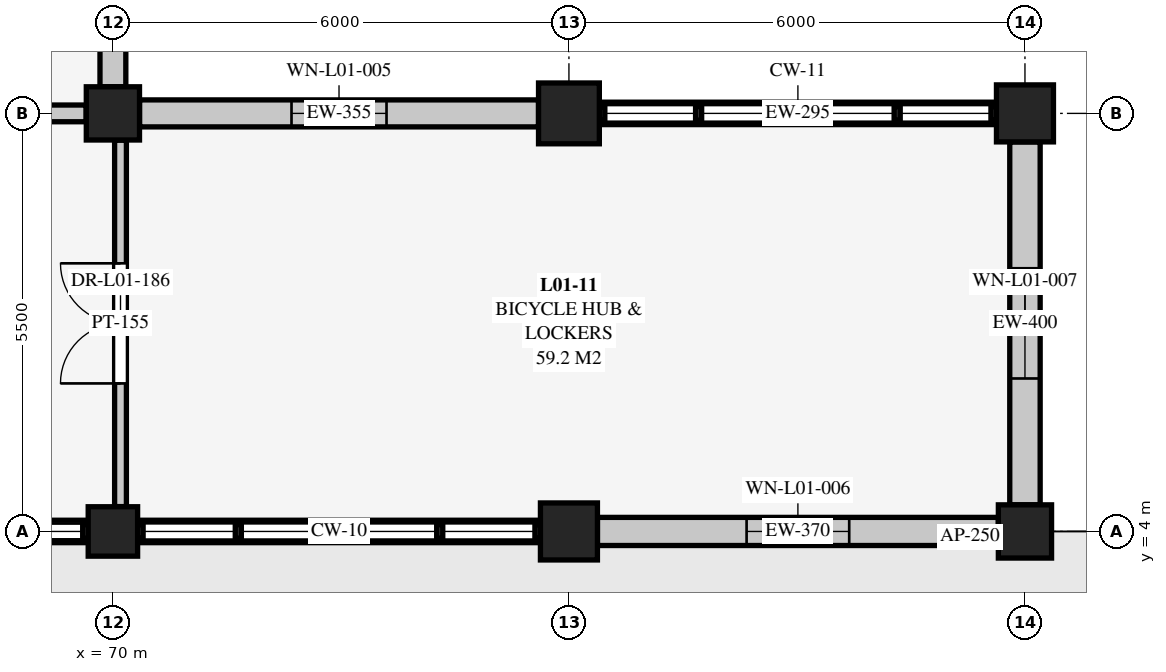
"""IFC4 building model, lengths in metres.
Left out: names, types, materials, properties, quantities, classifications, styles, units other than length and angle.
Written with IfcOpenShell. Run it as: python <this file> out.ifc"""

import sys

from ifc_helpers import new_model, si_unit, direction, frame, frame_2d, origin, origin_2d, place, context, subcontext, project, spatial, rectangle, extrude, element, fill, save


model = new_model("IFC4")
c1 = context("Model", 3, precision=1e-05, world=origin(), true_north=direction((0.0, 1.0)))
c2 = subcontext(c1, "Body", "Model", "MODEL_VIEW")
j1 = project(units=[si_unit("LENGTHUNIT", "METRE"), si_unit("PLANEANGLEUNIT", "RADIAN")], contexts=[c1])
p1 = place(None, origin())
s1 = spatial("IfcSite", under=j1, at=p1, CompositionType="ELEMENT")
p2 = place(p1, origin())
s2 = spatial("IfcBuilding", under=s1, at=p2, CompositionType="ELEMENT")
p3 = place(p2, origin())
s3 = spatial("IfcBuildingStorey", under=s2, at=p3, CompositionType="ELEMENT", Elevation=0.0)
p4 = place(p3, frame((70.0, 4.0, 0.0), z_axis=(0.0, 0.0, 1.0), x_axis=(1.0, 0.0, 0.0)))
e1 = element("IfcColumn", 1, at=p4, inside=s3, PredefinedType="COLUMN", context=c2, shape_type="SweptSolid", body=[
    extrude(rectangle(XDim=0.65, YDim=0.65, at=origin_2d()), origin(), (0.0, 0.0, 1.0), 4.5),
])
p5 = place(p3, frame((70.0, 9.5, 0.0), z_axis=(0.0, 0.0, 1.0), x_axis=(1.0, 0.0, 0.0)))
e2 = element("IfcColumn", 2, at=p5, inside=s3, PredefinedType="COLUMN", context=c2, shape_type="SweptSolid", body=[
    extrude(rectangle(XDim=0.7, YDim=0.7, at=origin_2d()), origin(), (0.0, 0.0, 1.0), 4.5),
])
p6 = place(p3, frame((76.0, 4.0, 0.0), z_axis=(0.0, 0.0, 1.0), x_axis=(1.0, 0.0, 0.0)))
e3 = element("IfcColumn", 3, at=p6, inside=s3, PredefinedType="COLUMN", context=c2, shape_type="SweptSolid", body=[
    extrude(rectangle(XDim=0.75, YDim=0.75, at=origin_2d()), origin(), (0.0, 0.0, 1.0), 4.5),
])
p7 = place(p3, frame((76.0, 9.5, 0.0), z_axis=(0.0, 0.0, 1.0), x_axis=(1.0, 0.0, 0.0)))
e4 = element("IfcColumn", 4, at=p7, inside=s3, PredefinedType="COLUMN", context=c2, shape_type="SweptSolid", body=[
    extrude(rectangle(XDim=0.8, YDim=0.8, at=origin_2d()), origin(), (0.0, 0.0, 1.0), 4.5),
])
p8 = place(p3, frame((82.0, 4.0, 0.0), z_axis=(0.0, 0.0, 1.0), x_axis=(1.0, 0.0, 0.0)))
e5 = element("IfcColumn", 5, at=p8, inside=s3, PredefinedType="COLUMN", context=c2, shape_type="SweptSolid", body=[
    extrude(rectangle(XDim=0.7, YDim=0.7, at=origin_2d()), origin(), (0.0, 0.0, 1.0), 4.5),
])
p9 = place(p3, frame((82.0, 9.5, 0.0), z_axis=(0.0, 0.0, 1.0), x_axis=(1.0, 0.0, 0.0)))
e6 = element("IfcColumn", 6, at=p9, inside=s3, PredefinedType="COLUMN", context=c2, shape_type="SweptSolid", body=[
    extrude(rectangle(XDim=0.75, YDim=0.75, at=origin_2d()), origin(), (0.0, 0.0, 1.0), 4.5),
])
p10 = place(p3, frame((69.675, 4.0, 0.0), z_axis=(0.0, 0.0, 1.0), x_axis=(-1.0, 0.0, 0.0)))
e7 = element("IfcWall", 7, at=p10, inside=s3, PredefinedType="SOLIDWALL", context=c2, shape_type="SweptSolid", body=[
    extrude(rectangle(XDim=5.3, YDim=0.295, at=frame_2d((2.65, 0.0))), origin(), (0.0, 0.0, 1.0), 0.16),
])
p11 = place(p3, frame((75.625, 4.0, 0.0), z_axis=(0.0, 0.0, 1.0), x_axis=(-1.0, 0.0, 0.0)))
e8 = element("IfcWall", 8, at=p11, inside=s3, PredefinedType="SOLIDWALL", context=c2, shape_type="SweptSolid", body=[
    extrude(rectangle(XDim=5.3, YDim=0.295, at=frame_2d((2.65, 0.0))), origin(), (0.0, 0.0, 1.0), 0.21),
])
p12 = place(p3, frame((70.35, 9.5, 0.0), z_axis=(0.0, 0.0, 1.0), x_axis=(1.0, 0.0, 0.0)))
e9 = element("IfcWall", 9, at=p12, inside=s3, PredefinedType="SOLIDWALL", context=c2, shape_type="SweptSolid", body=[
    extrude(rectangle(XDim=5.25, YDim=0.355, at=frame_2d((2.625, 0.0))), origin(), (0.0, 0.0, 1.0), 3.845),
])
p13 = place(p12, frame((2.0, 0.0, 0.8)))
e10 = element("IfcOpeningElement", 10, at=p13, cuts=e9, PredefinedType="OPENING", context=c2, shape_type="SweptSolid", body=[
    extrude(rectangle(XDim=1.25, YDim=2.15, at=frame_2d((0.625, 1.075))), frame((0.0, 0.188, 0.0), z_axis=(0.0, -1.0, 0.0), x_axis=(1.0, 0.0, 0.0)), (0.0, 0.0, 1.0), 0.375),
])
p14 = place(p3, frame((81.65, 4.0, 0.0), z_axis=(0.0, 0.0, 1.0), x_axis=(-1.0, 0.0, 0.0)))
e11 = element("IfcWall", 11, at=p14, inside=s3, PredefinedType="SOLIDWALL", context=c2, shape_type="SweptSolid", body=[
    extrude(rectangle(XDim=5.275, YDim=0.37, at=frame_2d((2.637, 0.0))), origin(), (0.0, 0.0, 1.0), 3.869),
])
p15 = place(p14, frame((1.962, 0.0, 0.8)))
e12 = element("IfcOpeningElement", 12, at=p15, cuts=e11, PredefinedType="OPENING", context=c2, shape_type="SweptSolid", body=[
    extrude(rectangle(XDim=1.35, YDim=2.15, at=frame_2d((0.675, 1.075))), frame((0.0, 0.195, 0.0), z_axis=(0.0, -1.0, 0.0), x_axis=(1.0, 0.0, 0.0)), (0.0, 0.0, 1.0), 0.39),
])
p16 = place(p3, frame((76.4, 9.5, 0.0), z_axis=(0.0, 0.0, 1.0), x_axis=(1.0, 0.0, 0.0)))
e13 = element("IfcWall", 13, at=p16, inside=s3, PredefinedType="SOLIDWALL", context=c2, shape_type="SweptSolid", body=[
    extrude(rectangle(XDim=5.225, YDim=0.295, at=frame_2d((2.613, 0.0))), origin(), (0.0, 0.0, 1.0), 0.26),
])
p17 = place(p3, frame((82.0, 9.125, 0.0), z_axis=(0.0, 0.0, 1.0), x_axis=(0.0, -1.0, 0.0)))
e14 = element("IfcWall", 14, at=p17, inside=s3, PredefinedType="SOLIDWALL", context=c2, shape_type="SweptSolid", body=[
    extrude(rectangle(XDim=4.775, YDim=0.4, at=frame_2d((2.387, 0.0))), origin(), (0.0, 0.0, 1.0), 3.869),
])
p18 = place(p17, frame((1.663, 0.0, 0.75)))
e15 = element("IfcOpeningElement", 15, at=p18, cuts=e14, PredefinedType="OPENING", context=c2, shape_type="SweptSolid", body=[
    extrude(rectangle(XDim=1.45, YDim=2.25, at=frame_2d((0.725, 1.125))), frame((0.0, 0.21, 0.0), z_axis=(0.0, -1.0, 0.0), x_axis=(1.0, 0.0, 0.0)), (0.0, 0.0, 1.0), 0.42),
])
p19 = place(p3, frame((70.0, 14.625, 0.0), z_axis=(0.0, 0.0, 1.0), x_axis=(0.0, -1.0, 0.0)))
e16 = element("IfcWall", 16, at=p19, inside=s3, PredefinedType="SOLIDWALL", context=c2, shape_type="SweptSolid", body=[
    extrude(rectangle(XDim=4.775, YDim=0.34, at=frame_2d((2.387, 0.0))), origin(), (0.0, 0.0, 1.0), 3.845),
])
p20 = place(p19, frame((1.413, 0.0, 0.7)))
e17 = element("IfcOpeningElement", 17, at=p20, cuts=e16, PredefinedType="OPENING", context=c2, shape_type="SweptSolid", body=[
    extrude(rectangle(XDim=1.95, YDim=2.35, at=frame_2d((0.975, 1.175))), frame((0.0, 0.18, 0.0), z_axis=(0.0, -1.0, 0.0), x_axis=(1.0, 0.0, 0.0)), (0.0, 0.0, 1.0), 0.36),
])
p21 = place(p3, frame((70.1, 4.327, 0.0), z_axis=(0.0, 0.0, 1.0), x_axis=(0.0, 1.0, 0.0)))
e18 = element("IfcWall", 18, at=p21, inside=s3, PredefinedType="PARTITIONING", context=c2, shape_type="SweptSolid", body=[
    extrude(rectangle(XDim=4.821, YDim=0.155, at=frame_2d((2.411, 0.0))), origin(), (0.0, 0.0, 1.0), 3.644),
])
p22 = place(p21, frame((1.621, 0.0, 0.0)))
e19 = element("IfcOpeningElement", 19, at=p22, cuts=e18, PredefinedType="OPENING", context=c2, shape_type="SweptSolid", body=[
    extrude(rectangle(XDim=1.58, YDim=2.2, at=frame_2d((0.79, 1.1))), frame((0.0, 0.088, 0.0), z_axis=(0.0, -1.0, 0.0), x_axis=(1.0, 0.0, 0.0)), (0.0, 0.0, 1.0), 0.175),
])
p23 = place(p3, frame((65.0, 9.5, 0.0), z_axis=(0.0, 0.0, 1.0), x_axis=(1.0, 0.0, 0.0)))
e20 = element("IfcWall", 20, at=p23, inside=s3, PredefinedType="SOLIDWALL", context=c2, shape_type="SweptSolid", body=[
    extrude(rectangle(XDim=4.648, YDim=0.22, at=frame_2d((2.324, 0.0))), origin(), (0.0, 0.0, 1.0), 3.713),
])
p24 = place(p23, frame((1.534, 0.0, 0.0)))
e21 = element("IfcOpeningElement", 21, at=p24, cuts=e20, PredefinedType="OPENING", context=c2, shape_type="SweptSolid", body=[
    extrude(rectangle(XDim=1.58, YDim=2.2, at=frame_2d((0.79, 1.1))), frame((0.0, 0.12, 0.0), z_axis=(0.0, -1.0, 0.0), x_axis=(1.0, 0.0, 0.0)), (0.0, 0.0, 1.0), 0.24),
])
p25 = place(p13, origin())
e22 = element("IfcWindow", 22, at=p25, inside=s3, PartitioningType="SINGLE_PANEL", PredefinedType="WINDOW", context=c2, shape_type="SweptSolid", body=[
    extrude(rectangle(XDim=1.25, YDim=2.15, at=frame_2d((0.625, 1.075))), frame((0.0, 0.03, 0.0), z_axis=(0.0, -1.0, 0.0), x_axis=(1.0, 0.0, 0.0)), (0.0, 0.0, 1.0), 0.06),
])
fill(e10, e22)
p26 = place(p15, origin())
e23 = element("IfcWindow", 23, at=p26, inside=s3, PartitioningType="SINGLE_PANEL", PredefinedType="WINDOW", context=c2, shape_type="SweptSolid", body=[
    extrude(rectangle(XDim=1.35, YDim=2.15, at=frame_2d((0.675, 1.075))), frame((0.0, 0.03, 0.0), z_axis=(0.0, -1.0, 0.0), x_axis=(1.0, 0.0, 0.0)), (0.0, 0.0, 1.0), 0.06),
])
fill(e12, e23)
p27 = place(p18, origin())
e24 = element("IfcWindow", 24, at=p27, inside=s3, PartitioningType="SINGLE_PANEL", PredefinedType="WINDOW", context=c2, shape_type="SweptSolid", body=[
    extrude(rectangle(XDim=1.45, YDim=2.25, at=frame_2d((0.725, 1.125))), frame((0.0, 0.03, 0.0), z_axis=(0.0, -1.0, 0.0), x_axis=(1.0, 0.0, 0.0)), (0.0, 0.0, 1.0), 0.06),
])
fill(e15, e24)
p28 = place(p22, origin())
e25 = element("IfcDoor", 25, at=p28, inside=s3, OperationType="DOUBLE_DOOR_SINGLE_SWING", PredefinedType="DOOR", context=c2, shape_type="SweptSolid", body=[
    extrude(rectangle(XDim=1.58, YDim=2.2, at=frame_2d((0.79, 1.1))), frame((0.0, 0.025, 0.0), z_axis=(0.0, -1.0, 0.0), x_axis=(1.0, 0.0, 0.0)), (0.0, 0.0, 1.0), 0.05),
])
fill(e19, e25)
save(model, sys.argv[1])
